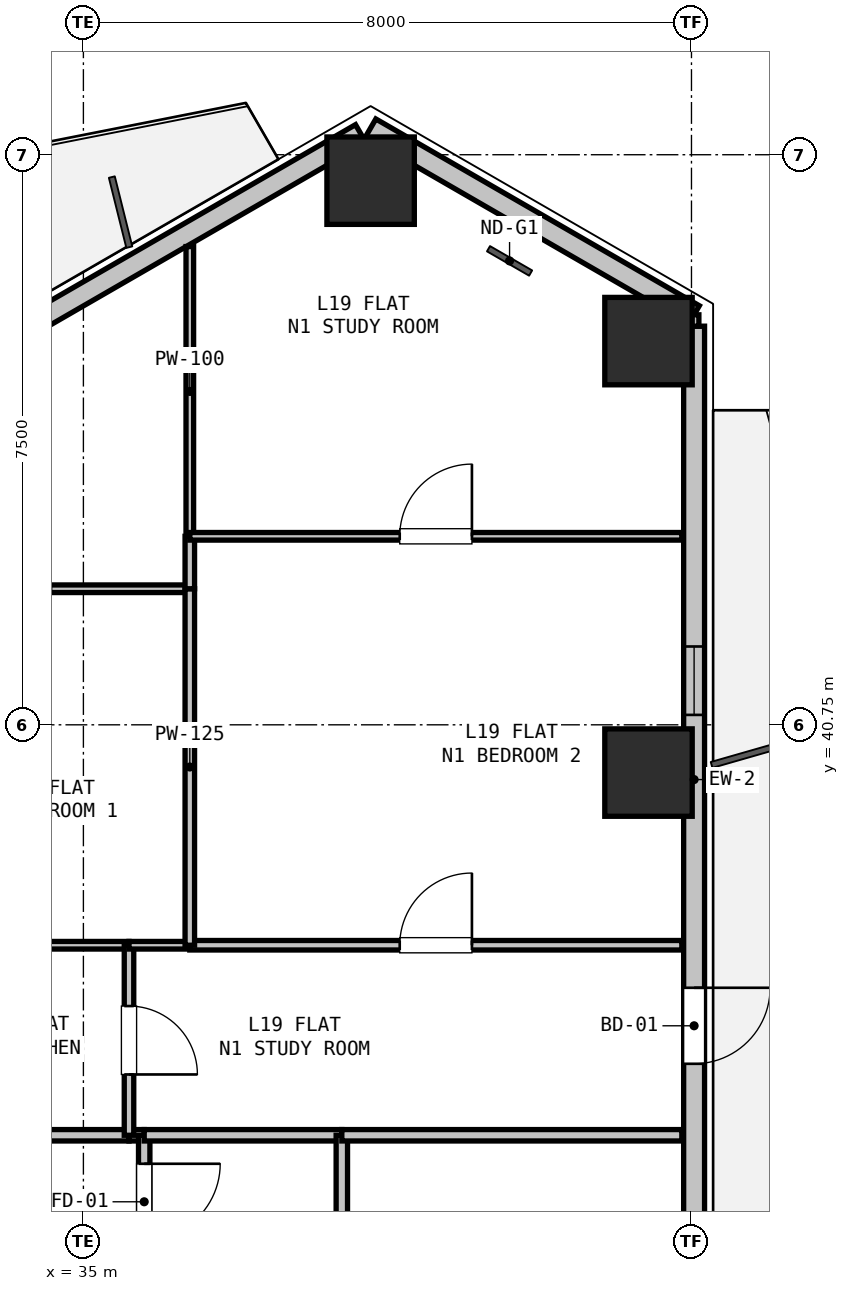
"""IFC4 building model, lengths in metres.
Left out: names, types, materials, properties, quantities, classifications, styles, units other than length and angle.
Written with IfcOpenShell. Run it as: python <this file> out.ifc"""

import sys

from ifc_helpers import new_model, si_unit, direction, frame, frame_2d, origin, origin_2d, place, context, subcontext, project, spatial, rectangle, hollow_rectangle, extrude, element, fill, save


model = new_model("IFC4")
c1 = context("Model", 3, precision=1e-05, world=origin(), true_north=direction((0.0, 1.0)))
c2 = subcontext(c1, "Body", "Model", "MODEL_VIEW")
j1 = project(units=[si_unit("LENGTHUNIT", "METRE"), si_unit("PLANEANGLEUNIT", "RADIAN")], contexts=[c1])
p1 = place(None, origin())
s1 = spatial("IfcSite", under=j1, at=p1, CompositionType="ELEMENT")
p2 = place(p1, origin())
s2 = spatial("IfcBuilding", under=s1, at=p2, CompositionType="ELEMENT")
p3 = place(p2, frame((0.0, 0.0, 73.5)))
s3 = spatial("IfcBuildingStorey", under=s2, at=p3, CompositionType="ELEMENT", Elevation=73.5)
for number, where, z_axis, x_axis in (
    (1, (38.779, 47.909, 0.0), (0.0, 0.0, 1.0), (1.0, 0.0, 0.0)),
    (2, (42.435, 45.798, 0.0), (0.0, 0.0, 1.0), (1.0, 0.0, 0.0)),
    (3, (42.435, 40.122, 0.0), (0.0, 0.0, 1.0), (1.0, 0.0, 0.0)),
):
    element("IfcColumn", number, at=place(p3, frame(where, z_axis=z_axis, x_axis=x_axis)), inside=s3, PredefinedType="COLUMN", context=c2, shape_type="SweptSolid", body=[
        extrude(hollow_rectangle(XDim=1.15, YDim=1.15, WallThickness=0.032, at=origin_2d()), origin(), (0.0, 0.0, 1.0), 3.3),
    ])
p4 = place(p3, frame((38.779, 48.602, 0.0), z_axis=(0.0, 0.0, 1.0), x_axis=(0.866011848704, -0.500023477353, 0.0)))
e4 = element("IfcWall", 4, at=p4, inside=s3, PredefinedType="SOLIDWALL", context=c2, shape_type="SweptSolid", body=[
    extrude(rectangle(XDim=4.914, YDim=0.275, at=frame_2d((2.457, 0.0))), origin(), (0.0, 0.0, 1.0), 2.67),
])
p5 = place(p3, frame((28.317, 42.562, 0.0), z_axis=(0.0, 0.0, 1.0), x_axis=(0.866023023012, 0.500004123596, 0.0)))
e5 = element("IfcWall", 5, at=p5, inside=s3, PredefinedType="SOLIDWALL", context=c2, shape_type="SweptSolid", body=[
    extrude(rectangle(XDim=11.93, YDim=0.275, at=frame_2d((5.965, 0.0))), origin(), (0.0, 0.0, 1.0), 2.67),
])
p6 = place(p5, frame((2.427, 0.0, 0.9)))
e6 = element("IfcOpeningElement", 6, at=p6, cuts=e5, PredefinedType="OPENING", context=c2, shape_type="SweptSolid", body=[
    extrude(rectangle(XDim=0.9, YDim=1.4, at=frame_2d((0.45, 0.7))), frame((0.0, 0.147, 0.0), z_axis=(0.0, -1.0, 0.0), x_axis=(1.0, 0.0, 0.0)), (0.0, 0.0, 1.0), 0.295),
])
p7 = place(p3, frame((43.035, 45.994, 0.0), z_axis=(0.0, 0.0, 1.0), x_axis=(0.0, -1.0, 0.0)))
e7 = element("IfcWall", 7, at=p7, inside=s3, PredefinedType="SOLIDWALL", context=c2, shape_type="SweptSolid", body=[
    extrude(rectangle(XDim=11.93, YDim=0.275, at=frame_2d((5.965, 0.0))), origin(), (0.0, 0.0, 1.0), 2.67),
])
p8 = place(p7, frame((8.704, 0.0, 0.0)))
e8 = element("IfcOpeningElement", 8, at=p8, cuts=e7, PredefinedType="OPENING", context=c2, shape_type="SweptSolid", body=[
    extrude(rectangle(XDim=1.0, YDim=2.1, at=frame_2d((0.5, 1.05))), frame((0.0, 0.147, 0.0), z_axis=(0.0, -1.0, 0.0), x_axis=(1.0, 0.0, 0.0)), (0.0, 0.0, 1.0), 0.295),
])
p9 = place(p7, frame((4.214, 0.0, 0.9)))
e9 = element("IfcOpeningElement", 9, at=p9, cuts=e7, PredefinedType="OPENING", context=c2, shape_type="SweptSolid", body=[
    extrude(rectangle(XDim=0.9, YDim=1.4, at=frame_2d((0.45, 0.7))), frame((0.0, 0.147, 0.0), z_axis=(0.0, -1.0, 0.0), x_axis=(1.0, 0.0, 0.0)), (0.0, 0.0, 1.0), 0.295),
])
p10 = place(p3, frame((32.0, 35.35, 0.0), z_axis=(0.0, 0.0, 1.0), x_axis=(1.0, 0.0, 0.0)))
e10 = element("IfcWall", 10, at=p10, inside=s3, PredefinedType="PARTITIONING", context=c2, shape_type="SweptSolid", body=[
    extrude(rectangle(XDim=3.6, YDim=0.15, at=frame_2d((1.8, 0.0))), origin(), (0.0, 0.0, 1.0), 3.05),
])
p11 = place(p3, frame((35.6, 35.35, 0.0), z_axis=(0.0, 0.0, 1.0), x_axis=(1.0, 0.0, 0.0)))
e11 = element("IfcWall", 11, at=p11, inside=s3, PredefinedType="PARTITIONING", context=c2, shape_type="SweptSolid", body=[
    extrude(rectangle(XDim=0.2, YDim=0.15, at=frame_2d((0.1, 0.0))), origin(), (0.0, 0.0, 1.0), 3.05),
])
p12 = place(p3, frame((35.8, 35.35, 0.0), z_axis=(0.0, 0.0, 1.0), x_axis=(0.0, -1.0, 0.0)))
e12 = element("IfcWall", 12, at=p12, inside=s3, PredefinedType="PARTITIONING", context=c2, shape_type="SweptSolid", body=[
    extrude(rectangle(XDim=1.75, YDim=0.15, at=frame_2d((0.875, 0.0))), origin(), (0.0, 0.0, 1.0), 3.05),
])
p13 = place(p12, frame((0.375, 0.0, 0.0)))
e13 = element("IfcOpeningElement", 13, at=p13, cuts=e12, PredefinedType="OPENING", context=c2, shape_type="SweptSolid", body=[
    extrude(rectangle(XDim=1.0, YDim=2.15, at=frame_2d((0.5, 1.075))), frame((0.0, 0.085, 0.0), z_axis=(0.0, -1.0, 0.0), x_axis=(1.0, 0.0, 0.0)), (0.0, 0.0, 1.0), 0.17),
])
p14 = place(p3, frame((35.8, 35.35, 0.0), z_axis=(0.0, 0.0, 1.0), x_axis=(1.0, 0.0, 0.0)))
e14 = element("IfcWall", 14, at=p14, inside=s3, PredefinedType="PARTITIONING", context=c2, shape_type="SweptSolid", body=[
    extrude(rectangle(XDim=2.6, YDim=0.15, at=frame_2d((1.3, 0.0))), origin(), (0.0, 0.0, 1.0), 2.423),
])
p15 = place(p3, frame((38.4, 35.35, 0.0), z_axis=(0.0, 0.0, 1.0), x_axis=(0.0, -1.0, 0.0)))
e15 = element("IfcWall", 15, at=p15, inside=s3, PredefinedType="PARTITIONING", context=c2, shape_type="SweptSolid", body=[
    extrude(rectangle(XDim=5.35, YDim=0.15, at=frame_2d((2.675, 0.0))), origin(), (0.0, 0.0, 1.0), 3.05),
])
p16 = place(p3, frame((32.0, 37.85, 0.0), z_axis=(0.0, 0.0, 1.0), x_axis=(1.0, 0.0, 0.0)))
e16 = element("IfcWall", 16, at=p16, inside=s3, PredefinedType="PARTITIONING", context=c2, shape_type="SweptSolid", body=[
    extrude(rectangle(XDim=3.6, YDim=0.1, at=frame_2d((1.8, 0.0))), origin(), (0.0, 0.0, 1.0), 3.05),
])
p17 = place(p3, frame((35.6, 37.85, 0.0), z_axis=(0.0, 0.0, 1.0), x_axis=(0.0, -1.0, 0.0)))
e17 = element("IfcWall", 17, at=p17, inside=s3, PredefinedType="PARTITIONING", context=c2, shape_type="SweptSolid", body=[
    extrude(rectangle(XDim=2.5, YDim=0.125, at=frame_2d((1.25, 0.0))), origin(), (0.0, 0.0, 1.0), 3.05),
])
p18 = place(p17, frame((0.8, 0.0, 0.0)))
e18 = element("IfcOpeningElement", 18, at=p18, cuts=e17, PredefinedType="OPENING", context=c2, shape_type="SweptSolid", body=[
    extrude(rectangle(XDim=0.9, YDim=2.1, at=frame_2d((0.45, 1.05))), frame((0.0, 0.073, 0.0), z_axis=(0.0, -1.0, 0.0), x_axis=(1.0, 0.0, 0.0)), (0.0, 0.0, 1.0), 0.145),
])
p19 = place(p3, frame((42.873, 35.35, 0.0), z_axis=(0.0, 0.0, 1.0), x_axis=(-1.0, 0.0, 0.0)))
e19 = element("IfcWall", 19, at=p19, inside=s3, PredefinedType="PARTITIONING", context=c2, shape_type="SweptSolid", body=[
    extrude(rectangle(XDim=4.473, YDim=0.15, at=frame_2d((2.237, 0.0))), origin(), (0.0, 0.0, 1.0), 2.365),
])
p20 = place(p3, frame((35.6, 37.85, 0.0), z_axis=(0.0, 0.0, 1.0), x_axis=(1.0, 0.0, 0.0)))
e20 = element("IfcWall", 20, at=p20, inside=s3, PredefinedType="PARTITIONING", context=c2, shape_type="SweptSolid", body=[
    extrude(rectangle(XDim=0.8, YDim=0.1, at=frame_2d((0.4, 0.0))), origin(), (0.0, 0.0, 1.0), 3.05),
])
p21 = place(p3, frame((36.4, 37.85, 0.0), z_axis=(0.0, 0.0, 1.0), x_axis=(1.0, 0.0, 0.0)))
e21 = element("IfcWall", 21, at=p21, inside=s3, PredefinedType="PARTITIONING", context=c2, shape_type="SweptSolid", body=[
    extrude(rectangle(XDim=6.473, YDim=0.125, at=frame_2d((3.237, 0.0))), origin(), (0.0, 0.0, 1.0), 2.365),
])
p22 = place(p21, frame((2.762, 0.0, 0.0)))
e22 = element("IfcOpeningElement", 22, at=p22, cuts=e21, PredefinedType="OPENING", context=c2, shape_type="SweptSolid", body=[
    extrude(rectangle(XDim=0.95, YDim=2.1, at=frame_2d((0.475, 1.05))), frame((0.0, 0.073, 0.0), z_axis=(0.0, -1.0, 0.0), x_axis=(1.0, 0.0, 0.0)), (0.0, 0.0, 1.0), 0.145),
])
p23 = place(p3, frame((31.8, 42.54, 0.0), z_axis=(0.0, 0.0, 1.0), x_axis=(1.0, 0.0, 0.0)))
e23 = element("IfcWall", 23, at=p23, inside=s3, PredefinedType="PARTITIONING", context=c2, shape_type="SweptSolid", body=[
    extrude(rectangle(XDim=4.6, YDim=0.1, at=frame_2d((2.3, 0.0))), origin(), (0.0, 0.0, 1.0), 3.05),
])
p24 = place(p23, frame((1.825, 0.0, 0.0)))
e24 = element("IfcOpeningElement", 24, at=p24, cuts=e23, PredefinedType="OPENING", context=c2, shape_type="SweptSolid", body=[
    extrude(rectangle(XDim=0.95, YDim=2.1, at=frame_2d((0.475, 1.05))), frame((0.0, 0.06, 0.0), z_axis=(0.0, -1.0, 0.0), x_axis=(1.0, 0.0, 0.0)), (0.0, 0.0, 1.0), 0.12),
])
p25 = place(p3, frame((36.4, 42.54, 0.0), z_axis=(0.0, 0.0, 1.0), x_axis=(0.0, -1.0, 0.0)))
e25 = element("IfcWall", 25, at=p25, inside=s3, PredefinedType="PARTITIONING", context=c2, shape_type="SweptSolid", body=[
    extrude(rectangle(XDim=4.69, YDim=0.125, at=frame_2d((2.345, 0.0))), origin(), (0.0, 0.0, 1.0), 3.05),
])
p26 = place(p3, frame((36.4, 47.042, 0.0), z_axis=(0.0, 0.0, 1.0), x_axis=(0.0, -1.0, 0.0)))
e26 = element("IfcWall", 26, at=p26, inside=s3, PredefinedType="PARTITIONING", context=c2, shape_type="SweptSolid", body=[
    extrude(rectangle(XDim=3.812, YDim=0.1, at=frame_2d((1.906, 0.0))), origin(), (0.0, 0.0, 1.0), 2.66),
])
p27 = place(p3, frame((36.4, 43.23, 0.0), z_axis=(0.0, 0.0, 1.0), x_axis=(0.0, -1.0, 0.0)))
e27 = element("IfcWall", 27, at=p27, inside=s3, PredefinedType="PARTITIONING", context=c2, shape_type="SweptSolid", body=[
    extrude(rectangle(XDim=0.69, YDim=0.125, at=frame_2d((0.345, 0.0))), origin(), (0.0, 0.0, 1.0), 3.05),
])
p28 = place(p3, frame((36.4, 43.23, 0.0), z_axis=(0.0, 0.0, 1.0), x_axis=(1.0, 0.0, 0.0)))
e28 = element("IfcWall", 28, at=p28, inside=s3, PredefinedType="PARTITIONING", context=c2, shape_type="SweptSolid", body=[
    extrude(rectangle(XDim=6.473, YDim=0.1, at=frame_2d((3.237, 0.0))), origin(), (0.0, 0.0, 1.0), 2.423),
])
p29 = place(p28, frame((2.762, 0.0, 0.0)))
e29 = element("IfcOpeningElement", 29, at=p29, cuts=e28, PredefinedType="OPENING", context=c2, shape_type="SweptSolid", body=[
    extrude(rectangle(XDim=0.95, YDim=2.1, at=frame_2d((0.475, 1.05))), frame((0.0, 0.06, 0.0), z_axis=(0.0, -1.0, 0.0), x_axis=(1.0, 0.0, 0.0)), (0.0, 0.0, 1.0), 0.12),
])
p30 = place(p3, frame((43.035, 46.144, 0.0), z_axis=(0.0, 0.0, 1.0), x_axis=(0.0, -1.0, 0.0)))
e30 = element("IfcWall", 30, at=p30, inside=s3, PredefinedType="PARTITIONING", context=c2, shape_type="SweptSolid", body=[
    extrude(rectangle(XDim=0.15, YDim=0.125, at=frame_2d((0.075, 0.0))), origin(), (0.0, 0.0, 1.0), 3.05),
])
p31 = place(p8, origin())
e31 = element("IfcDoor", 31, at=p31, inside=s3, OperationType="SINGLE_SWING_LEFT", PredefinedType="DOOR", context=c2, shape_type="SweptSolid", body=[
    extrude(rectangle(XDim=1.0, YDim=2.1, at=frame_2d((0.5, 1.05))), frame((0.0, 0.025, 0.0), z_axis=(0.0, -1.0, 0.0), x_axis=(1.0, 0.0, 0.0)), (0.0, 0.0, 1.0), 0.05),
])
fill(e8, e31)
p32 = place(p9, origin())
e32 = element("IfcWindow", 32, at=p32, inside=s3, PartitioningType="SINGLE_PANEL", PredefinedType="WINDOW", context=c2, shape_type="SweptSolid", body=[
    extrude(rectangle(XDim=0.9, YDim=1.4, at=frame_2d((0.45, 0.7))), frame((0.0, 0.03, 0.0), z_axis=(0.0, -1.0, 0.0), x_axis=(1.0, 0.0, 0.0)), (0.0, 0.0, 1.0), 0.06),
])
fill(e9, e32)
p33 = place(p13, origin())
e33 = element("IfcDoor", 33, at=p33, inside=s3, OperationType="SINGLE_SWING_LEFT", PredefinedType="DOOR", context=c2, shape_type="SweptSolid", body=[
    extrude(rectangle(XDim=1.0, YDim=2.15, at=frame_2d((0.5, 1.075))), frame((0.0, 0.025, 0.0), z_axis=(0.0, -1.0, 0.0), x_axis=(1.0, 0.0, 0.0)), (0.0, 0.0, 1.0), 0.05),
])
fill(e13, e33)
p34 = place(p22, origin())
e34 = element("IfcDoor", 34, at=p34, inside=s3, OperationType="SINGLE_SWING_RIGHT", PredefinedType="DOOR", context=c2, shape_type="SweptSolid", body=[
    extrude(rectangle(XDim=0.95, YDim=2.1, at=frame_2d((0.475, 1.05))), frame((0.0, 0.025, 0.0), z_axis=(0.0, -1.0, 0.0), x_axis=(1.0, 0.0, 0.0)), (0.0, 0.0, 1.0), 0.05),
])
fill(e22, e34)
p35 = place(p29, origin())
e35 = element("IfcDoor", 35, at=p35, inside=s3, OperationType="SINGLE_SWING_RIGHT", PredefinedType="DOOR", context=c2, shape_type="SweptSolid", body=[
    extrude(rectangle(XDim=0.95, YDim=2.1, at=frame_2d((0.475, 1.05))), frame((0.0, 0.025, 0.0), z_axis=(0.0, -1.0, 0.0), x_axis=(1.0, 0.0, 0.0)), (0.0, 0.0, 1.0), 0.05),
])
fill(e29, e35)
p36 = place(p18, origin())
e36 = element("IfcDoor", 36, at=p36, inside=s3, OperationType="SINGLE_SWING_RIGHT", PredefinedType="DOOR", context=c2, shape_type="SweptSolid", body=[
    extrude(rectangle(XDim=0.9, YDim=2.1, at=frame_2d((0.45, 1.05))), frame((0.0, 0.025, 0.0), z_axis=(0.0, -1.0, 0.0), x_axis=(1.0, 0.0, 0.0)), (0.0, 0.0, 1.0), 0.05),
])
fill(e18, e36)
save(model, sys.argv[1])
